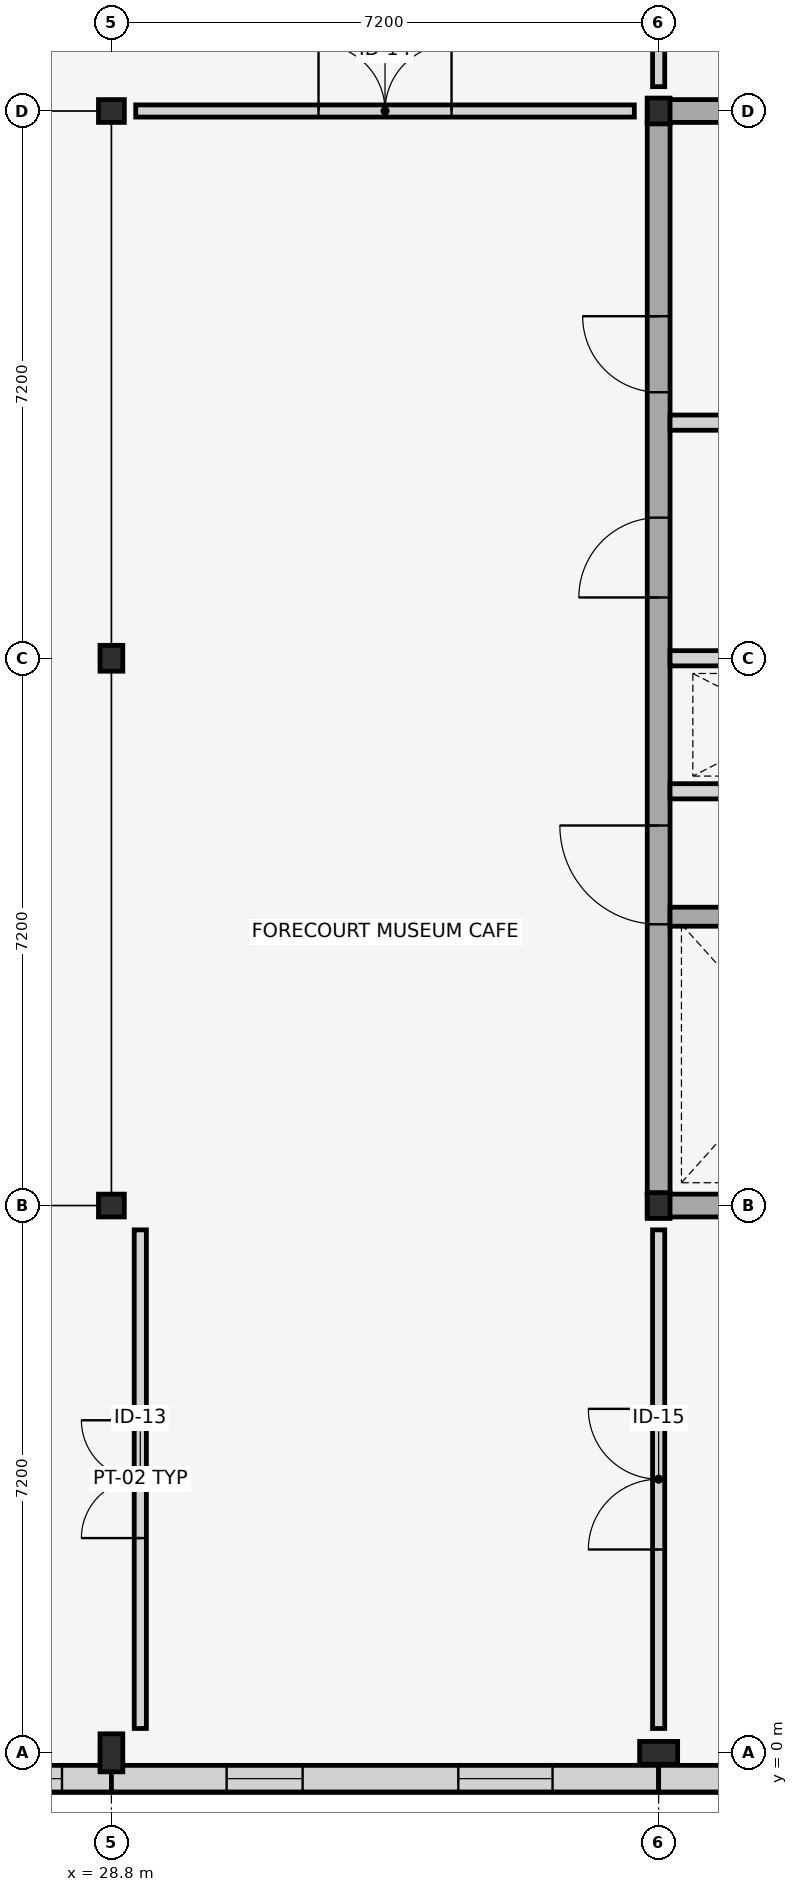
"""IFC4 building model, lengths in metres.
Left out: names, types, materials, properties, quantities, classifications, styles, units other than length and angle.
Written with IfcOpenShell. Run it as: python <this file> out.ifc"""

import sys

from ifc_helpers import new_model, si_unit, direction, frame, frame_2d, origin, origin_2d, place, context, subcontext, project, spatial, rectangle, i_section, extrude, element, fill, save


model = new_model("IFC4")
c1 = context("Model", 3, precision=1e-05, world=origin(), true_north=direction((0.0, 1.0)))
c2 = subcontext(c1, "Body", "Model", "MODEL_VIEW")
j1 = project(units=[si_unit("LENGTHUNIT", "METRE"), si_unit("PLANEANGLEUNIT", "RADIAN")], contexts=[c1])
p1 = place(None, origin())
s1 = spatial("IfcSite", under=j1, at=p1, CompositionType="ELEMENT")
p2 = place(p1, origin())
s2 = spatial("IfcBuilding", under=s1, at=p2, CompositionType="ELEMENT")
p3 = place(p2, origin())
s3 = spatial("IfcBuildingStorey", under=s2, at=p3, CompositionType="ELEMENT", Elevation=0.0)
p4 = place(p3, frame((28.8, 0.0, 0.0), z_axis=(0.0, 0.0, 1.0), x_axis=(1.0, 0.0, 0.0)))
e1 = element("IfcColumn", 1, at=p4, inside=s3, PredefinedType="COLUMN", context=c2, shape_type="SweptSolid", body=[
    extrude(i_section(OverallWidth=0.3, OverallDepth=0.5, WebThickness=0.014, FlangeThickness=0.028, FilletRadius=0.027, at=origin_2d()), origin(), (0.0, 0.0, 1.0), 4.5),
])
for number, where, z_axis, x_axis in (
    (2, (28.8, 7.2, 0.0), (0.0, 0.0, 1.0), (0.0, 1.0, 0.0)),
    (3, (28.8, 14.4, 0.0), (0.0, 0.0, 1.0), (1.0, 0.0, 0.0)),
    (4, (28.8, 21.6, 0.0), (0.0, 0.0, 1.0), (0.0, 1.0, 0.0)),
):
    element("IfcColumn", number, at=place(p3, frame(where, z_axis=z_axis, x_axis=x_axis)), inside=s3, PredefinedType="COLUMN", context=c2, shape_type="SweptSolid", body=[
        extrude(i_section(OverallWidth=0.3, OverallDepth=0.34, WebThickness=0.012, FlangeThickness=0.021, FilletRadius=0.027, at=origin_2d()), origin(), (0.0, 0.0, 1.0), 4.5),
    ])
p5 = place(p3, frame((36.0, 0.0, 0.0), z_axis=(0.0, 0.0, 1.0), x_axis=(0.0, 1.0, 0.0)))
e5 = element("IfcColumn", 5, at=p5, inside=s3, PredefinedType="COLUMN", context=c2, shape_type="SweptSolid", body=[
    extrude(i_section(OverallWidth=0.3, OverallDepth=0.5, WebThickness=0.014, FlangeThickness=0.028, FilletRadius=0.027, at=origin_2d()), origin(), (0.0, 0.0, 1.0), 4.5),
])
for number, where, z_axis, x_axis in (
    (6, (36.0, 7.2, 0.0), (0.0, 0.0, 1.0), (1.0, 0.0, 0.0)),
    (7, (36.0, 21.6, 0.0), (0.0, 0.0, 1.0), (1.0, 0.0, 0.0)),
):
    element("IfcColumn", number, at=place(p3, frame(where, z_axis=z_axis, x_axis=x_axis)), inside=s3, PredefinedType="COLUMN", context=c2, shape_type="SweptSolid", body=[
        extrude(i_section(OverallWidth=0.3, OverallDepth=0.34, WebThickness=0.012, FlangeThickness=0.021, FilletRadius=0.027, at=origin_2d()), origin(), (0.0, 0.0, 1.0), 4.5),
    ])
p6 = place(p3, frame((21.6, -0.34, 0.0), z_axis=(0.0, 0.0, 1.0), x_axis=(1.0, 0.0, 0.0)))
e8 = element("IfcWall", 8, at=p6, inside=s3, PredefinedType="STANDARD", context=c2, shape_type="SweptSolid", body=[
    extrude(rectangle(XDim=7.2, YDim=0.35, at=frame_2d((3.6, 0.0))), origin(), (0.0, 0.0, 1.0), 4.5),
])
p7 = place(p6, frame((2.65, 0.0, 0.0)))
e9 = element("IfcOpeningElement", 9, at=p7, cuts=e8, PredefinedType="OPENING", context=c2, shape_type="SweptSolid", body=[
    extrude(rectangle(XDim=1.9, YDim=2.45, at=frame_2d((0.95, 1.225))), frame((0.0, 0.185, 0.0), z_axis=(0.0, -1.0, 0.0), x_axis=(1.0, 0.0, 0.0)), (0.0, 0.0, 1.0), 0.37),
])
p8 = place(p6, frame((2.55, 0.0, 2.6)))
e10 = element("IfcOpeningElement", 10, at=p8, cuts=e8, PredefinedType="OPENING", context=c2, shape_type="SweptSolid", body=[
    extrude(rectangle(XDim=2.1, YDim=1.15, at=frame_2d((1.05, 0.575))), frame((0.0, 0.185, 0.0), z_axis=(0.0, -1.0, 0.0), x_axis=(1.0, 0.0, 0.0)), (0.0, 0.0, 1.0), 0.37),
])
p9 = place(p6, frame((0.65, 0.0, 0.35)))
e11 = element("IfcOpeningElement", 11, at=p9, cuts=e8, PredefinedType="OPENING", context=c2, shape_type="SweptSolid", body=[
    extrude(rectangle(XDim=1.1, YDim=2.0, at=frame_2d((0.55, 1.0))), frame((0.0, 0.185, 0.0), z_axis=(0.0, -1.0, 0.0), x_axis=(1.0, 0.0, 0.0)), (0.0, 0.0, 1.0), 0.37),
])
p10 = place(p6, frame((5.45, 0.0, 0.35)))
e12 = element("IfcOpeningElement", 12, at=p10, cuts=e8, PredefinedType="OPENING", context=c2, shape_type="SweptSolid", body=[
    extrude(rectangle(XDim=1.1, YDim=2.0, at=frame_2d((0.55, 1.0))), frame((0.0, 0.185, 0.0), z_axis=(0.0, -1.0, 0.0), x_axis=(1.0, 0.0, 0.0)), (0.0, 0.0, 1.0), 0.37),
])
p11 = place(p3, frame((28.8, -0.34, 0.0), z_axis=(0.0, 0.0, 1.0), x_axis=(1.0, 0.0, 0.0)))
e13 = element("IfcWall", 13, at=p11, inside=s3, PredefinedType="STANDARD", context=c2, shape_type="SweptSolid", body=[
    extrude(rectangle(XDim=7.2, YDim=0.35, at=frame_2d((3.6, 0.0))), origin(), (0.0, 0.0, 1.0), 4.5),
])
p12 = place(p11, frame((1.516, 0.0, 0.9)))
e14 = element("IfcOpeningElement", 14, at=p12, cuts=e13, PredefinedType="OPENING", context=c2, shape_type="SweptSolid", body=[
    extrude(rectangle(XDim=1.0, YDim=2.1, at=frame_2d((0.5, 1.05))), frame((0.0, 0.185, 0.0), z_axis=(0.0, -1.0, 0.0), x_axis=(1.0, 0.0, 0.0)), (0.0, 0.0, 1.0), 0.37),
])
p13 = place(p11, frame((4.564, 0.0, 0.9)))
e15 = element("IfcOpeningElement", 15, at=p13, cuts=e13, PredefinedType="OPENING", context=c2, shape_type="SweptSolid", body=[
    extrude(rectangle(XDim=1.24, YDim=2.1, at=frame_2d((0.62, 1.05))), frame((0.0, 0.185, 0.0), z_axis=(0.0, -1.0, 0.0), x_axis=(1.0, 0.0, 0.0)), (0.0, 0.0, 1.0), 0.37),
])
p14 = place(p3, frame((36.0, -0.34, 0.0), z_axis=(0.0, 0.0, 1.0), x_axis=(1.0, 0.0, 0.0)))
e16 = element("IfcWall", 16, at=p14, inside=s3, PredefinedType="STANDARD", context=c2, shape_type="SweptSolid", body=[
    extrude(rectangle(XDim=7.365, YDim=0.35, at=frame_2d((3.683, 0.0))), origin(), (0.0, 0.0, 1.0), 4.5),
])
p15 = place(p14, frame((1.276, 0.0, 0.9)))
e17 = element("IfcOpeningElement", 17, at=p15, cuts=e16, PredefinedType="OPENING", context=c2, shape_type="SweptSolid", body=[
    extrude(rectangle(XDim=1.48, YDim=2.1, at=frame_2d((0.74, 1.05))), frame((0.0, 0.185, 0.0), z_axis=(0.0, -1.0, 0.0), x_axis=(1.0, 0.0, 0.0)), (0.0, 0.0, 1.0), 0.37),
])
p16 = place(p14, frame((4.324, 0.0, 0.9)))
e18 = element("IfcOpeningElement", 18, at=p16, cuts=e16, PredefinedType="OPENING", context=c2, shape_type="SweptSolid", body=[
    extrude(rectangle(XDim=1.72, YDim=2.1, at=frame_2d((0.86, 1.05))), frame((0.0, 0.185, 0.0), z_axis=(0.0, -1.0, 0.0), x_axis=(1.0, 0.0, 0.0)), (0.0, 0.0, 1.0), 0.37),
])
for number, where, z_axis, x_axis in (
    (19, (35.85, 7.2, 0.0), (0.0, 0.0, 1.0), (1.0, 0.0, 0.0)),
    (20, (35.85, 21.6, 0.0), (0.0, 0.0, 1.0), (1.0, 0.0, 0.0)),
):
    element("IfcWall", number, at=place(p3, frame(where, z_axis=z_axis, x_axis=x_axis)), inside=s3, PredefinedType="SHEAR", context=c2, shape_type="SweptSolid", body=[
        extrude(rectangle(XDim=7.35, YDim=0.3, at=frame_2d((3.675, 0.0))), origin(), (0.0, 0.0, 1.0), 4.28),
    ])
p17 = place(p3, frame((36.0, 7.35, 0.0), z_axis=(0.0, 0.0, 1.0), x_axis=(0.0, 1.0, 0.0)))
e21 = element("IfcWall", 21, at=p17, inside=s3, PredefinedType="SHEAR", context=c2, shape_type="SweptSolid", body=[
    extrude(rectangle(XDim=14.1, YDim=0.3, at=frame_2d((7.05, 0.0))), origin(), (0.0, 0.0, 1.0), 4.28),
])
p18 = place(p17, frame((3.55, 0.0, 0.0)))
e22 = element("IfcOpeningElement", 22, at=p18, cuts=e21, PredefinedType="OPENING", context=c2, shape_type="SweptSolid", body=[
    extrude(rectangle(XDim=1.3, YDim=2.2, at=frame_2d((0.65, 1.1))), frame((0.0, 0.16, 0.0), z_axis=(0.0, -1.0, 0.0), x_axis=(1.0, 0.0, 0.0)), (0.0, 0.0, 1.0), 0.32),
])
p19 = place(p17, frame((7.85, 0.0, 0.0)))
e23 = element("IfcOpeningElement", 23, at=p19, cuts=e21, PredefinedType="OPENING", context=c2, shape_type="SweptSolid", body=[
    extrude(rectangle(XDim=1.05, YDim=2.15, at=frame_2d((0.525, 1.075))), frame((0.0, 0.16, 0.0), z_axis=(0.0, -1.0, 0.0), x_axis=(1.0, 0.0, 0.0)), (0.0, 0.0, 1.0), 0.32),
])
p20 = place(p17, frame((10.55, 0.0, 0.0)))
e24 = element("IfcOpeningElement", 24, at=p20, cuts=e21, PredefinedType="OPENING", context=c2, shape_type="SweptSolid", body=[
    extrude(rectangle(XDim=1.0, YDim=2.15, at=frame_2d((0.5, 1.075))), frame((0.0, 0.16, 0.0), z_axis=(0.0, -1.0, 0.0), x_axis=(1.0, 0.0, 0.0)), (0.0, 0.0, 1.0), 0.32),
])
p21 = place(p3, frame((36.15, 12.65, 0.0), z_axis=(0.0, 0.0, 1.0), x_axis=(1.0, 0.0, 0.0)))
e25 = element("IfcWall", 25, at=p21, inside=s3, PredefinedType="PLUMBINGWALL", context=c2, shape_type="SweptSolid", body=[
    extrude(rectangle(XDim=3.55, YDim=0.2, at=frame_2d((1.775, 0.0))), origin(), (0.0, 0.0, 1.0), 3.7),
])
p22 = place(p21, frame((0.9, 0.0, 0.0)))
e26 = element("IfcOpeningElement", 26, at=p22, cuts=e25, PredefinedType="OPENING", context=c2, shape_type="SweptSolid", body=[
    extrude(rectangle(XDim=0.85, YDim=2.05, at=frame_2d((0.425, 1.025))), frame((0.0, 0.11, 0.0), z_axis=(0.0, -1.0, 0.0), x_axis=(1.0, 0.0, 0.0)), (0.0, 0.0, 1.0), 0.22),
])
p23 = place(p3, frame((36.15, 11.0, 0.0), z_axis=(0.0, 0.0, 1.0), x_axis=(1.0, 0.0, 0.0)))
e27 = element("IfcWall", 27, at=p23, inside=s3, PredefinedType="SHEAR", context=c2, shape_type="SweptSolid", body=[
    extrude(rectangle(XDim=3.375, YDim=0.25, at=frame_2d((1.688, 0.0))), origin(), (0.0, 0.0, 1.0), 4.28),
])
for number, where, z_axis, x_axis in (
    (28, (36.15, 14.4, 0.0), (0.0, 0.0, 1.0), (1.0, 0.0, 0.0)),
    (29, (36.15, 17.5, 0.0), (0.0, 0.0, 1.0), (1.0, 0.0, 0.0)),
):
    element("IfcWall", number, at=place(p3, frame(where, z_axis=z_axis, x_axis=x_axis)), inside=s3, PredefinedType="PLUMBINGWALL", context=c2, shape_type="SweptSolid", body=[
        extrude(rectangle(XDim=3.55, YDim=0.2, at=frame_2d((1.775, 0.0))), origin(), (0.0, 0.0, 1.0), 3.7),
    ])
p24 = place(p3, frame((29.18, 0.32, 0.0), z_axis=(0.0, 0.0, 1.0), x_axis=(0.0, 1.0, 0.0)))
e30 = element("IfcWall", 30, at=p24, inside=s3, PredefinedType="PARTITIONING", context=c2, shape_type="SweptSolid", body=[
    extrude(rectangle(XDim=6.56, YDim=0.16, at=frame_2d((3.28, 0.0))), origin(), (0.0, 0.0, 1.0), 3.45),
])
p25 = place(p24, frame((2.505, 0.0, 0.0)))
e31 = element("IfcOpeningElement", 31, at=p25, cuts=e30, PredefinedType="OPENING", context=c2, shape_type="SweptSolid", body=[
    extrude(rectangle(XDim=1.55, YDim=2.4, at=frame_2d((0.775, 1.2))), frame((0.0, 0.09, 0.0), z_axis=(0.0, -1.0, 0.0), x_axis=(1.0, 0.0, 0.0)), (0.0, 0.0, 1.0), 0.18),
])
p26 = place(p3, frame((29.12, 21.6, 0.0), z_axis=(0.0, 0.0, 1.0), x_axis=(1.0, 0.0, 0.0)))
e32 = element("IfcWall", 32, at=p26, inside=s3, PredefinedType="PARTITIONING", context=c2, shape_type="SweptSolid", body=[
    extrude(rectangle(XDim=6.56, YDim=0.16, at=frame_2d((3.28, 0.0))), origin(), (0.0, 0.0, 1.0), 3.45),
])
p27 = place(p26, frame((2.405, 0.0, 0.0)))
e33 = element("IfcOpeningElement", 33, at=p27, cuts=e32, PredefinedType="OPENING", context=c2, shape_type="SweptSolid", body=[
    extrude(rectangle(XDim=1.75, YDim=2.45, at=frame_2d((0.875, 1.225))), frame((0.0, 0.09, 0.0), z_axis=(0.0, -1.0, 0.0), x_axis=(1.0, 0.0, 0.0)), (0.0, 0.0, 1.0), 0.18),
])
p28 = place(p3, frame((36.0, 0.32, 0.0), z_axis=(0.0, 0.0, 1.0), x_axis=(0.0, 1.0, 0.0)))
e34 = element("IfcWall", 34, at=p28, inside=s3, PredefinedType="PARTITIONING", context=c2, shape_type="SweptSolid", body=[
    extrude(rectangle(XDim=6.56, YDim=0.16, at=frame_2d((3.28, 0.0))), origin(), (0.0, 0.0, 1.0), 3.45),
])
p29 = place(p28, frame((2.355, 0.0, 0.0)))
e35 = element("IfcOpeningElement", 35, at=p29, cuts=e34, PredefinedType="OPENING", context=c2, shape_type="SweptSolid", body=[
    extrude(rectangle(XDim=1.85, YDim=2.5, at=frame_2d((0.925, 1.25))), frame((0.0, 0.09, 0.0), z_axis=(0.0, -1.0, 0.0), x_axis=(1.0, 0.0, 0.0)), (0.0, 0.0, 1.0), 0.18),
])
p30 = place(p3, frame((36.0, 21.92, 0.0), z_axis=(0.0, 0.0, 1.0), x_axis=(0.0, 1.0, 0.0)))
e36 = element("IfcWall", 36, at=p30, inside=s3, PredefinedType="PARTITIONING", context=c2, shape_type="SweptSolid", body=[
    extrude(rectangle(XDim=6.56, YDim=0.16, at=frame_2d((3.28, 0.0))), origin(), (0.0, 0.0, 1.0), 3.45),
])
p31 = place(p30, frame((2.255, 0.0, 0.0)))
e37 = element("IfcOpeningElement", 37, at=p31, cuts=e36, PredefinedType="OPENING", context=c2, shape_type="SweptSolid", body=[
    extrude(rectangle(XDim=2.05, YDim=2.55, at=frame_2d((1.025, 1.275))), frame((0.0, 0.09, 0.0), z_axis=(0.0, -1.0, 0.0), x_axis=(1.0, 0.0, 0.0)), (0.0, 0.0, 1.0), 0.18),
])
p32 = place(p10, origin())
e38 = element("IfcWindow", 38, at=p32, inside=s3, PartitioningType="SINGLE_PANEL", PredefinedType="WINDOW", context=c2, shape_type="SweptSolid", body=[
    extrude(rectangle(XDim=1.1, YDim=2.0, at=frame_2d((0.55, 1.0))), frame((0.0, 0.03, 0.0), z_axis=(0.0, -1.0, 0.0), x_axis=(1.0, 0.0, 0.0)), (0.0, 0.0, 1.0), 0.06),
])
fill(e12, e38)
p33 = place(p12, origin())
e39 = element("IfcWindow", 39, at=p33, inside=s3, PartitioningType="SINGLE_PANEL", PredefinedType="WINDOW", context=c2, shape_type="SweptSolid", body=[
    extrude(rectangle(XDim=1.0, YDim=2.1, at=frame_2d((0.5, 1.05))), frame((0.0, 0.03, 0.0), z_axis=(0.0, -1.0, 0.0), x_axis=(1.0, 0.0, 0.0)), (0.0, 0.0, 1.0), 0.06),
])
fill(e14, e39)
p34 = place(p13, origin())
e40 = element("IfcWindow", 40, at=p34, inside=s3, PartitioningType="SINGLE_PANEL", PredefinedType="WINDOW", context=c2, shape_type="SweptSolid", body=[
    extrude(rectangle(XDim=1.24, YDim=2.1, at=frame_2d((0.62, 1.05))), frame((0.0, 0.03, 0.0), z_axis=(0.0, -1.0, 0.0), x_axis=(1.0, 0.0, 0.0)), (0.0, 0.0, 1.0), 0.06),
])
fill(e15, e40)
p35 = place(p18, origin())
e41 = element("IfcDoor", 41, at=p35, inside=s3, OperationType="SINGLE_SWING_RIGHT", PredefinedType="DOOR", context=c2, shape_type="SweptSolid", body=[
    extrude(rectangle(XDim=1.3, YDim=2.2, at=frame_2d((0.65, 1.1))), frame((0.0, 0.025, 0.0), z_axis=(0.0, -1.0, 0.0), x_axis=(1.0, 0.0, 0.0)), (0.0, 0.0, 1.0), 0.05),
])
fill(e22, e41)
p36 = place(p19, origin())
e42 = element("IfcDoor", 42, at=p36, inside=s3, OperationType="SINGLE_SWING_LEFT", PredefinedType="DOOR", context=c2, shape_type="SweptSolid", body=[
    extrude(rectangle(XDim=1.05, YDim=2.15, at=frame_2d((0.525, 1.075))), frame((0.0, 0.025, 0.0), z_axis=(0.0, -1.0, 0.0), x_axis=(1.0, 0.0, 0.0)), (0.0, 0.0, 1.0), 0.05),
])
fill(e23, e42)
p37 = place(p20, origin())
e43 = element("IfcDoor", 43, at=p37, inside=s3, OperationType="SINGLE_SWING_RIGHT", PredefinedType="DOOR", context=c2, shape_type="SweptSolid", body=[
    extrude(rectangle(XDim=1.0, YDim=2.15, at=frame_2d((0.5, 1.075))), frame((0.0, 0.025, 0.0), z_axis=(0.0, -1.0, 0.0), x_axis=(1.0, 0.0, 0.0)), (0.0, 0.0, 1.0), 0.05),
])
fill(e24, e43)
p38 = place(p25, origin())
e44 = element("IfcDoor", 44, at=p38, inside=s3, OperationType="DOUBLE_DOOR_SINGLE_SWING", PredefinedType="DOOR", context=c2, shape_type="SweptSolid", body=[
    extrude(rectangle(XDim=1.55, YDim=2.4, at=frame_2d((0.775, 1.2))), frame((0.0, 0.025, 0.0), z_axis=(0.0, -1.0, 0.0), x_axis=(1.0, 0.0, 0.0)), (0.0, 0.0, 1.0), 0.05),
])
fill(e31, e44)
p39 = place(p27, origin())
e45 = element("IfcDoor", 45, at=p39, inside=s3, OperationType="DOUBLE_DOOR_SINGLE_SWING", PredefinedType="DOOR", context=c2, shape_type="SweptSolid", body=[
    extrude(rectangle(XDim=1.75, YDim=2.45, at=frame_2d((0.875, 1.225))), frame((0.0, 0.025, 0.0), z_axis=(0.0, -1.0, 0.0), x_axis=(1.0, 0.0, 0.0)), (0.0, 0.0, 1.0), 0.05),
])
fill(e33, e45)
p40 = place(p29, origin())
e46 = element("IfcDoor", 46, at=p40, inside=s3, OperationType="DOUBLE_DOOR_SINGLE_SWING", PredefinedType="DOOR", context=c2, shape_type="SweptSolid", body=[
    extrude(rectangle(XDim=1.85, YDim=2.5, at=frame_2d((0.925, 1.25))), frame((0.0, 0.025, 0.0), z_axis=(0.0, -1.0, 0.0), x_axis=(1.0, 0.0, 0.0)), (0.0, 0.0, 1.0), 0.05),
])
fill(e35, e46)
save(model, sys.argv[1])
